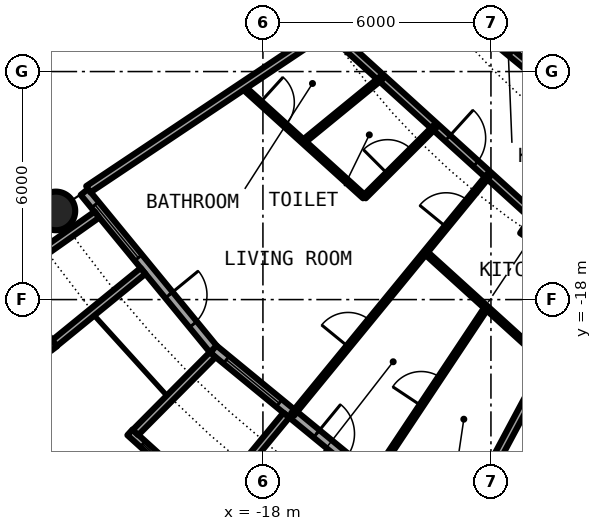
"""IFC4 building model, lengths in metres.
Left out: names, types, materials, properties, quantities, classifications, styles, units other than length and angle.
Written with IfcOpenShell. Run it as: python <this file> out.ifc"""

import sys

from ifc_helpers import new_model, si_unit, direction, frame, frame_2d, origin, origin_2d, place, context, subcontext, project, spatial, rectangle, circle, hollow_circle, i_section, extrude, element, fill, save


model = new_model("IFC4")
c1 = context("Model", 3, precision=1e-05, world=origin(), true_north=direction((0.0, 1.0)))
c2 = subcontext(c1, "Body", "Model", "MODEL_VIEW")
j1 = project(units=[si_unit("LENGTHUNIT", "METRE"), si_unit("PLANEANGLEUNIT", "RADIAN")], contexts=[c1])
p1 = place(None, origin())
s1 = spatial("IfcSite", under=j1, at=p1, CompositionType="ELEMENT")
p2 = place(p1, origin())
s2 = spatial("IfcBuilding", under=s1, at=p2, CompositionType="ELEMENT")
p3 = place(p2, frame((0.0, 0.0, 41.1)))
s3 = spatial("IfcBuildingStorey", under=s2, at=p3, CompositionType="ELEMENT", Elevation=41.1)
p4 = place(p3, frame((-23.448, -15.667, 0.0), z_axis=(0.0, 0.0, 1.0), x_axis=(1.0, 0.0, 0.0)))
e1 = element("IfcColumn", 1, at=p4, inside=s3, PredefinedType="COLUMN", context=c2, shape_type="SweptSolid", body=[
    extrude(hollow_circle(Radius=0.508, WallThickness=0.05, at=origin_2d()), origin(), (0.0, 0.0, 1.0), 3.05),
])
p5 = place(p3, frame((-10.889, -16.297, 0.0), z_axis=(0.0, 0.0, 1.0), x_axis=(-0.55557023302, -0.831469612303, 0.0)))
e2 = element("IfcColumn", 2, at=p5, inside=s3, PredefinedType="COLUMN", context=c2, shape_type="SweptSolid", body=[
    extrude(i_section(OverallWidth=0.305, OverallDepth=0.62, WebThickness=0.021, FlangeThickness=0.04, FilletRadius=0.027, at=origin_2d()), origin(), (0.0, 0.0, 1.0), 3.05),
])
p6 = place(p3, frame((-22.699, -15.167, 0.0), z_axis=(0.0, 0.0, 1.0), x_axis=(0.634382322723, -0.773019449054, 0.0)))
e3 = element("IfcWall", 3, at=p6, inside=s3, PredefinedType="SOLIDWALL", context=c2, shape_type="SweptSolid", body=[
    extrude(rectangle(XDim=5.352, YDim=0.25, at=frame_2d((2.676, 0.0))), origin(), (0.0, 0.0, 1.0), 2.7),
])
p7 = place(p6, frame((0.441, 0.0, 0.3)))
e4 = element("IfcOpeningElement", 4, at=p7, cuts=e3, PredefinedType="OPENING", context=c2, shape_type="SweptSolid", body=[
    extrude(rectangle(XDim=1.8, YDim=2.1, at=frame_2d((0.9, 1.05))), frame((0.0, 0.135, 0.0), z_axis=(0.0, -1.0, 0.0), x_axis=(1.0, 0.0, 0.0)), (0.0, 0.0, 1.0), 0.27),
])
p8 = place(p6, frame((3.51, 0.0, 0.0)))
e5 = element("IfcOpeningElement", 5, at=p8, cuts=e3, PredefinedType="OPENING", context=c2, shape_type="SweptSolid", body=[
    extrude(rectangle(XDim=1.0, YDim=2.2, at=frame_2d((0.5, 1.1))), frame((0.0, 0.135, 0.0), z_axis=(0.0, -1.0, 0.0), x_axis=(1.0, 0.0, 0.0)), (0.0, 0.0, 1.0), 0.27),
])
p9 = place(p3, frame((-24.909, -17.427, -0.03), z_axis=(0.0, 0.0, 1.0), x_axis=(0.60418752353, -0.796842165306, 0.0)))
e6 = element("IfcWall", 6, at=p9, inside=s3, PredefinedType="SOLIDWALL", context=c2, shape_type="SweptSolid", body=[
    extrude(rectangle(XDim=2.337, YDim=0.2, at=frame_2d((1.168, 0.0))), origin(), (0.0, 0.0, 1.0), 2.73),
])
p10 = place(p9, frame((0.128, 0.0, 0.33)))
e7 = element("IfcOpeningElement", 7, at=p10, cuts=e6, PredefinedType="OPENING", context=c2, shape_type="SweptSolid", body=[
    extrude(circle(Radius=1.04, at=frame_2d((1.04, 1.04))), frame((0.0, 0.11, 0.0), z_axis=(0.0, -1.0, 0.0), x_axis=(1.0, 0.0, 0.0)), (0.0, 0.0, 1.0), 0.22),
])
p11 = place(p3, frame((-22.37, -15.765, -0.03), z_axis=(0.0, 0.0, 1.0), x_axis=(-0.817256123454, -0.576274612209, 0.0)))
e8 = element("IfcWall", 8, at=p11, inside=s3, PredefinedType="SOLIDWALL", context=c2, shape_type="SweptSolid", body=[
    extrude(rectangle(XDim=2.933, YDim=0.2, at=frame_2d((1.466, 0.0))), origin(), (0.0, 0.0, 1.0), 2.73),
])
p12 = place(p3, frame((-21.155, -17.246, -0.03), z_axis=(0.0, 0.0, 1.0), x_axis=(-0.775179004516, -0.631741648902, 0.0)))
e9 = element("IfcWall", 9, at=p12, inside=s3, PredefinedType="SOLIDWALL", context=c2, shape_type="SweptSolid", body=[
    extrude(rectangle(XDim=3.006, YDim=0.2, at=frame_2d((1.503, 0.0))), origin(), (0.0, 0.0, 1.0), 2.73),
])
p13 = place(p3, frame((-19.304, -19.304, 0.0), z_axis=(0.0, 0.0, 1.0), x_axis=(0.773019449054, -0.634382322723, 0.0)))
e10 = element("IfcWall", 10, at=p13, inside=s3, PredefinedType="SOLIDWALL", context=c2, shape_type="SweptSolid", body=[
    extrude(rectangle(XDim=5.352, YDim=0.25, at=frame_2d((2.676, 0.0))), origin(), (0.0, 0.0, 1.0), 2.7),
])
p14 = place(p13, frame((0.441, 0.0, 0.3)))
e11 = element("IfcOpeningElement", 11, at=p14, cuts=e10, PredefinedType="OPENING", context=c2, shape_type="SweptSolid", body=[
    extrude(rectangle(XDim=1.8, YDim=2.1, at=frame_2d((0.9, 1.05))), frame((0.0, 0.135, 0.0), z_axis=(0.0, -1.0, 0.0), x_axis=(1.0, 0.0, 0.0)), (0.0, 0.0, 1.0), 0.27),
])
p15 = place(p13, frame((3.51, 0.0, 0.0)))
e12 = element("IfcOpeningElement", 12, at=p15, cuts=e10, PredefinedType="OPENING", context=c2, shape_type="SweptSolid", body=[
    extrude(rectangle(XDim=1.0, YDim=2.2, at=frame_2d((0.5, 1.1))), frame((0.0, 0.135, 0.0), z_axis=(0.0, -1.0, 0.0), x_axis=(1.0, 0.0, 0.0)), (0.0, 0.0, 1.0), 0.27),
])
p16 = place(p3, frame((-21.5, -21.493, -0.03), z_axis=(0.0, 0.0, 1.0), x_axis=(0.740998365753, -0.671506829416, 0.0)))
e13 = element("IfcWall", 13, at=p16, inside=s3, PredefinedType="SOLIDWALL", context=c2, shape_type="SweptSolid", body=[
    extrude(rectangle(XDim=2.993, YDim=0.2, at=frame_2d((1.497, 0.0))), origin(), (0.0, 0.0, 1.0), 2.73),
])
p17 = place(p16, frame((0.457, 0.0, 0.33)))
e14 = element("IfcOpeningElement", 14, at=p17, cuts=e13, PredefinedType="OPENING", context=c2, shape_type="SweptSolid", body=[
    extrude(circle(Radius=1.04, at=frame_2d((1.04, 1.04))), frame((0.0, 0.11, 0.0), z_axis=(0.0, -1.0, 0.0), x_axis=(1.0, 0.0, 0.0)), (0.0, 0.0, 1.0), 0.22),
])
p18 = place(p3, frame((-19.323, -19.45, -0.03), z_axis=(0.0, 0.0, 1.0), x_axis=(-0.704476739375, -0.709727076896, 0.0)))
e15 = element("IfcWall", 15, at=p18, inside=s3, PredefinedType="SOLIDWALL", context=c2, shape_type="SweptSolid", body=[
    extrude(rectangle(XDim=2.883, YDim=0.2, at=frame_2d((1.441, 0.0))), origin(), (0.0, 0.0, 1.0), 2.73),
])
p19 = place(p3, frame((-17.384, -21.041, -0.03), z_axis=(0.0, 0.0, 1.0), x_axis=(-0.63709551667, -0.770784861449, 0.0)))
e16 = element("IfcWall", 16, at=p19, inside=s3, PredefinedType="SOLIDWALL", context=c2, shape_type="SweptSolid", body=[
    extrude(rectangle(XDim=3.006, YDim=0.2, at=frame_2d((1.503, 0.0))), origin(), (0.0, 0.0, 1.0), 2.73),
])
p20 = place(p3, frame((-18.545, -12.387, 0.0), z_axis=(0.0, 0.0, 1.0), x_axis=(0.740948416939, -0.671561943112, 0.0)))
e17 = element("IfcWall", 17, at=p20, inside=s3, PredefinedType="PARTITIONING", context=c2, shape_type="SweptSolid", body=[
    extrude(rectangle(XDim=4.335, YDim=0.1, at=frame_2d((2.167, 0.0))), origin(), (0.0, 0.0, 1.0), 2.7),
])
p21 = place(p20, frame((0.636, 0.0, 0.0)))
e18 = element("IfcOpeningElement", 18, at=p21, cuts=e17, PredefinedType="OPENING", context=c2, shape_type="SweptSolid", body=[
    extrude(rectangle(XDim=0.9, YDim=2.3, at=frame_2d((0.45, 1.15))), frame((0.0, 0.06, 0.0), z_axis=(0.0, -1.0, 0.0), x_axis=(1.0, 0.0, 0.0)), (0.0, 0.0, 1.0), 0.12),
])
p22 = place(p3, frame((-13.727, -16.754, 0.0), z_axis=(0.0, 0.0, 1.0), x_axis=(0.740840803797, -0.671680655839, 0.0)))
e19 = element("IfcWall", 19, at=p22, inside=s3, PredefinedType="PARTITIONING", context=c2, shape_type="SweptSolid", body=[
    extrude(rectangle(XDim=4.338, YDim=0.1, at=frame_2d((2.169, 0.0))), origin(), (0.0, 0.0, 1.0), 2.7),
])
p23 = place(p3, frame((-16.179, -10.994, 0.0), z_axis=(0.0, 0.0, 1.0), x_axis=(0.740659568799, -0.671880497668, 0.0)))
e20 = element("IfcWall", 20, at=p23, inside=s3, PredefinedType="PARTITIONING", context=c2, shape_type="SweptSolid", body=[
    extrude(rectangle(XDim=9.36, YDim=0.2, at=frame_2d((4.68, 0.0))), origin(), (0.0, 0.0, 1.0), 2.38),
])
p24 = place(p23, frame((4.105, 0.0, 0.0)))
e21 = element("IfcOpeningElement", 21, at=p24, cuts=e20, PredefinedType="OPENING", context=c2, shape_type="SweptSolid", body=[
    extrude(rectangle(XDim=1.0, YDim=2.3, at=frame_2d((0.5, 1.15))), frame((0.0, 0.11, 0.0), z_axis=(0.0, -1.0, 0.0), x_axis=(1.0, 0.0, 0.0)), (0.0, 0.0, 1.0), 0.22),
])
p25 = place(p3, frame((-14.038, -9.402, 0.0), z_axis=(0.0, 0.0, 1.0), x_axis=(0.773084654695, -0.634302858794, 0.0)))
e22 = element("IfcWall", 22, at=p25, inside=s3, PredefinedType="PARTITIONING", context=c2, shape_type="SweptSolid", body=[
    extrude(rectangle(XDim=9.793, YDim=0.2, at=frame_2d((4.896, 0.0))), origin(), (0.0, 0.0, 1.0), 2.7),
])
p26 = place(p25, frame((4.387, 0.0, 0.0)))
e23 = element("IfcOpeningElement", 23, at=p26, cuts=e22, PredefinedType="OPENING", context=c2, shape_type="SweptSolid", body=[
    extrude(rectangle(XDim=1.0, YDim=2.3, at=frame_2d((0.5, 1.15))), frame((0.0, 0.11, 0.0), z_axis=(0.0, -1.0, 0.0), x_axis=(1.0, 0.0, 0.0)), (0.0, 0.0, 1.0), 0.22),
])
p27 = place(p3, frame((-22.595, -15.097, 0.0), z_axis=(0.0, 0.0, 1.0), x_axis=(0.831465568067, 0.555576285599, 0.0)))
e24 = element("IfcWall", 24, at=p27, inside=s3, PredefinedType="PARTITIONING", context=c2, shape_type="SweptSolid", body=[
    extrude(rectangle(XDim=7.264, YDim=0.2, at=frame_2d((3.632, 0.0))), origin(), (0.0, 0.0, 1.0), 2.7),
])
p28 = place(p3, frame((-17.22, -21.022, 0.0), z_axis=(0.0, 0.0, 1.0), x_axis=(0.633794691983, 0.773501317655, 0.0)))
e25 = element("IfcWall", 25, at=p28, inside=s3, PredefinedType="PARTITIONING", context=c2, shape_type="SweptSolid", body=[
    extrude(rectangle(XDim=8.138, YDim=0.1, at=frame_2d((4.069, 0.0))), origin(), (0.0, 0.0, 1.0), 2.7),
])
p29 = place(p28, frame((6.377, 0.0, 0.0)))
e26 = element("IfcOpeningElement", 26, at=p29, cuts=e25, PredefinedType="OPENING", context=c2, shape_type="SweptSolid", body=[
    extrude(rectangle(XDim=0.9, YDim=2.3, at=frame_2d((0.45, 1.15))), frame((0.0, 0.06, 0.0), z_axis=(0.0, -1.0, 0.0), x_axis=(1.0, 0.0, 0.0)), (0.0, 0.0, 1.0), 0.12),
])
p30 = place(p28, frame((2.306, 0.0, 0.0)))
e27 = element("IfcOpeningElement", 27, at=p30, cuts=e25, PredefinedType="OPENING", context=c2, shape_type="SweptSolid", body=[
    extrude(rectangle(XDim=0.9, YDim=2.3, at=frame_2d((0.45, 1.15))), frame((0.0, 0.06, 0.0), z_axis=(0.0, -1.0, 0.0), x_axis=(1.0, 0.0, 0.0)), (0.0, 0.0, 1.0), 0.12),
])
p31 = place(p3, frame((-16.936, -13.845, 0.0), z_axis=(0.0, 0.0, 1.0), x_axis=(0.774162545943, 0.632986850147, 0.0)))
e28 = element("IfcWall", 28, at=p31, inside=s3, PredefinedType="PARTITIONING", context=c2, shape_type="SweptSolid", body=[
    extrude(rectangle(XDim=2.649, YDim=0.1, at=frame_2d((1.325, 0.0))), origin(), (0.0, 0.0, 1.0), 2.7),
])
p32 = place(p3, frame((-15.33, -15.3, 0.0), z_axis=(0.0, 0.0, 1.0), x_axis=(0.707851299421, 0.706361478217, 0.0)))
e29 = element("IfcWall", 29, at=p32, inside=s3, PredefinedType="PARTITIONING", context=c2, shape_type="SweptSolid", body=[
    extrude(rectangle(XDim=2.622, YDim=0.1, at=frame_2d((1.311, 0.0))), origin(), (0.0, 0.0, 1.0), 2.7),
])
p33 = place(p32, frame((0.861, 0.0, 0.0)))
e30 = element("IfcOpeningElement", 30, at=p33, cuts=e29, PredefinedType="OPENING", context=c2, shape_type="SweptSolid", body=[
    extrude(rectangle(XDim=0.9, YDim=2.3, at=frame_2d((0.45, 1.15))), frame((0.0, 0.06, 0.0), z_axis=(0.0, -1.0, 0.0), x_axis=(1.0, 0.0, 0.0)), (0.0, 0.0, 1.0), 0.12),
])
p34 = place(p3, frame((-15.054, -22.624, 0.0), z_axis=(0.0, 0.0, 1.0), x_axis=(0.553913391217, 0.832574294, 0.0)))
e31 = element("IfcWall", 31, at=p34, inside=s3, PredefinedType="PARTITIONING", context=c2, shape_type="SweptSolid", body=[
    extrude(rectangle(XDim=5.301, YDim=0.1, at=frame_2d((2.65, 0.0))), origin(), (0.0, 0.0, 1.0), 2.7),
])
p35 = place(p34, frame((2.2, 0.0, 0.0)))
e32 = element("IfcOpeningElement", 32, at=p35, cuts=e31, PredefinedType="OPENING", context=c2, shape_type="SweptSolid", body=[
    extrude(rectangle(XDim=0.9, YDim=2.3, at=frame_2d((0.45, 1.15))), frame((0.0, 0.06, 0.0), z_axis=(0.0, -1.0, 0.0), x_axis=(1.0, 0.0, 0.0)), (0.0, 0.0, 1.0), 0.12),
])
p36 = place(p3, frame((-12.81, -23.966, 0.0), z_axis=(0.0, 0.0, 1.0), x_axis=(0.471439510802, 0.881898399848, 0.0)))
e33 = element("IfcWall", 33, at=p36, inside=s3, PredefinedType="PARTITIONING", context=c2, shape_type="SweptSolid", body=[
    extrude(rectangle(XDim=7.575, YDim=0.2, at=frame_2d((3.787, 0.0))), origin(), (0.0, 0.0, 1.0), 2.7),
])
p37 = place(p3, frame((-11.524, -11.464, 0.0), z_axis=(0.0, 0.0, 1.0), x_axis=(0.708796844581, 0.705412668665, 0.0)))
e34 = element("IfcWall", 34, at=p37, inside=s3, PredefinedType="PARTITIONING", context=c2, shape_type="SweptSolid", body=[
    extrude(rectangle(XDim=2.597, YDim=0.1, at=frame_2d((1.299, 0.0))), origin(), (0.0, 0.0, 1.0), 2.7),
])
p38 = place(p37, frame((0.849, 0.0, 0.0)))
e35 = element("IfcOpeningElement", 35, at=p38, cuts=e34, PredefinedType="OPENING", context=c2, shape_type="SweptSolid", body=[
    extrude(rectangle(XDim=0.9, YDim=2.3, at=frame_2d((0.45, 1.15))), frame((0.0, 0.06, 0.0), z_axis=(0.0, -1.0, 0.0), x_axis=(1.0, 0.0, 0.0)), (0.0, 0.0, 1.0), 0.12),
])
p39 = place(p7, origin())
e36 = element("IfcWindow", 36, at=p39, inside=s3, PartitioningType="SINGLE_PANEL", PredefinedType="WINDOW", context=c2, shape_type="SweptSolid", body=[
    extrude(rectangle(XDim=1.8, YDim=2.1, at=frame_2d((0.9, 1.05))), frame((0.0, 0.03, 0.0), z_axis=(0.0, -1.0, 0.0), x_axis=(1.0, 0.0, 0.0)), (0.0, 0.0, 1.0), 0.06),
])
fill(e4, e36)
p40 = place(p8, origin())
e37 = element("IfcDoor", 37, at=p40, inside=s3, OperationType="SINGLE_SWING_LEFT", PredefinedType="DOOR", context=c2, shape_type="SweptSolid", body=[
    extrude(rectangle(XDim=1.0, YDim=2.2, at=frame_2d((0.5, 1.1))), frame((0.0, 0.025, 0.0), z_axis=(0.0, -1.0, 0.0), x_axis=(1.0, 0.0, 0.0)), (0.0, 0.0, 1.0), 0.05),
])
fill(e5, e37)
p41 = place(p14, origin())
e38 = element("IfcWindow", 38, at=p41, inside=s3, PartitioningType="SINGLE_PANEL", PredefinedType="WINDOW", context=c2, shape_type="SweptSolid", body=[
    extrude(rectangle(XDim=1.8, YDim=2.1, at=frame_2d((0.9, 1.05))), frame((0.0, 0.03, 0.0), z_axis=(0.0, -1.0, 0.0), x_axis=(1.0, 0.0, 0.0)), (0.0, 0.0, 1.0), 0.06),
])
fill(e11, e38)
p42 = place(p17, origin())
e39 = element("IfcWindow", 39, at=p42, inside=s3, PartitioningType="SINGLE_PANEL", PredefinedType="WINDOW", context=c2, shape_type="SweptSolid", body=[
    extrude(circle(Radius=1.04, at=frame_2d((1.04, 1.04))), frame((0.0, 0.03, 0.0), z_axis=(0.0, -1.0, 0.0), x_axis=(1.0, 0.0, 0.0)), (0.0, 0.0, 1.0), 0.06),
])
fill(e14, e39)
p43 = place(p15, origin())
e40 = element("IfcDoor", 40, at=p43, inside=s3, OperationType="SINGLE_SWING_LEFT", PredefinedType="DOOR", context=c2, shape_type="SweptSolid", body=[
    extrude(rectangle(XDim=1.0, YDim=2.2, at=frame_2d((0.5, 1.1))), frame((0.0, 0.025, 0.0), z_axis=(0.0, -1.0, 0.0), x_axis=(1.0, 0.0, 0.0)), (0.0, 0.0, 1.0), 0.05),
])
fill(e12, e40)
p44 = place(p24, origin())
e41 = element("IfcDoor", 41, at=p44, inside=s3, OperationType="SINGLE_SWING_LEFT", PredefinedType="DOOR", context=c2, shape_type="SweptSolid", body=[
    extrude(rectangle(XDim=1.0, YDim=2.3, at=frame_2d((0.5, 1.15))), frame((0.0, 0.025, 0.0), z_axis=(0.0, -1.0, 0.0), x_axis=(1.0, 0.0, 0.0)), (0.0, 0.0, 1.0), 0.05),
])
fill(e21, e41)
p45 = place(p21, origin())
e42 = element("IfcDoor", 42, at=p45, inside=s3, OperationType="SINGLE_SWING_LEFT", PredefinedType="DOOR", context=c2, shape_type="SweptSolid", body=[
    extrude(rectangle(XDim=0.9, YDim=2.3, at=frame_2d((0.45, 1.15))), frame((0.0, 0.025, 0.0), z_axis=(0.0, -1.0, 0.0), x_axis=(1.0, 0.0, 0.0)), (0.0, 0.0, 1.0), 0.05),
])
fill(e18, e42)
p46 = place(p33, origin())
e43 = element("IfcDoor", 43, at=p46, inside=s3, OperationType="SINGLE_SWING_RIGHT", PredefinedType="DOOR", context=c2, shape_type="SweptSolid", body=[
    extrude(rectangle(XDim=0.9, YDim=2.3, at=frame_2d((0.45, 1.15))), frame((0.0, 0.025, 0.0), z_axis=(0.0, -1.0, 0.0), x_axis=(1.0, 0.0, 0.0)), (0.0, 0.0, 1.0), 0.05),
])
fill(e30, e43)
p47 = place(p29, origin())
e44 = element("IfcDoor", 44, at=p47, inside=s3, OperationType="SINGLE_SWING_RIGHT", PredefinedType="DOOR", context=c2, shape_type="SweptSolid", body=[
    extrude(rectangle(XDim=0.9, YDim=2.3, at=frame_2d((0.45, 1.15))), frame((0.0, 0.025, 0.0), z_axis=(0.0, -1.0, 0.0), x_axis=(1.0, 0.0, 0.0)), (0.0, 0.0, 1.0), 0.05),
])
fill(e26, e44)
p48 = place(p30, origin())
e45 = element("IfcDoor", 45, at=p48, inside=s3, OperationType="SINGLE_SWING_LEFT", PredefinedType="DOOR", context=c2, shape_type="SweptSolid", body=[
    extrude(rectangle(XDim=0.9, YDim=2.3, at=frame_2d((0.45, 1.15))), frame((0.0, 0.025, 0.0), z_axis=(0.0, -1.0, 0.0), x_axis=(1.0, 0.0, 0.0)), (0.0, 0.0, 1.0), 0.05),
])
fill(e27, e45)
p49 = place(p35, origin())
e46 = element("IfcDoor", 46, at=p49, inside=s3, OperationType="SINGLE_SWING_RIGHT", PredefinedType="DOOR", context=c2, shape_type="SweptSolid", body=[
    extrude(rectangle(XDim=0.9, YDim=2.3, at=frame_2d((0.45, 1.15))), frame((0.0, 0.025, 0.0), z_axis=(0.0, -1.0, 0.0), x_axis=(1.0, 0.0, 0.0)), (0.0, 0.0, 1.0), 0.05),
])
fill(e32, e46)
save(model, sys.argv[1])
